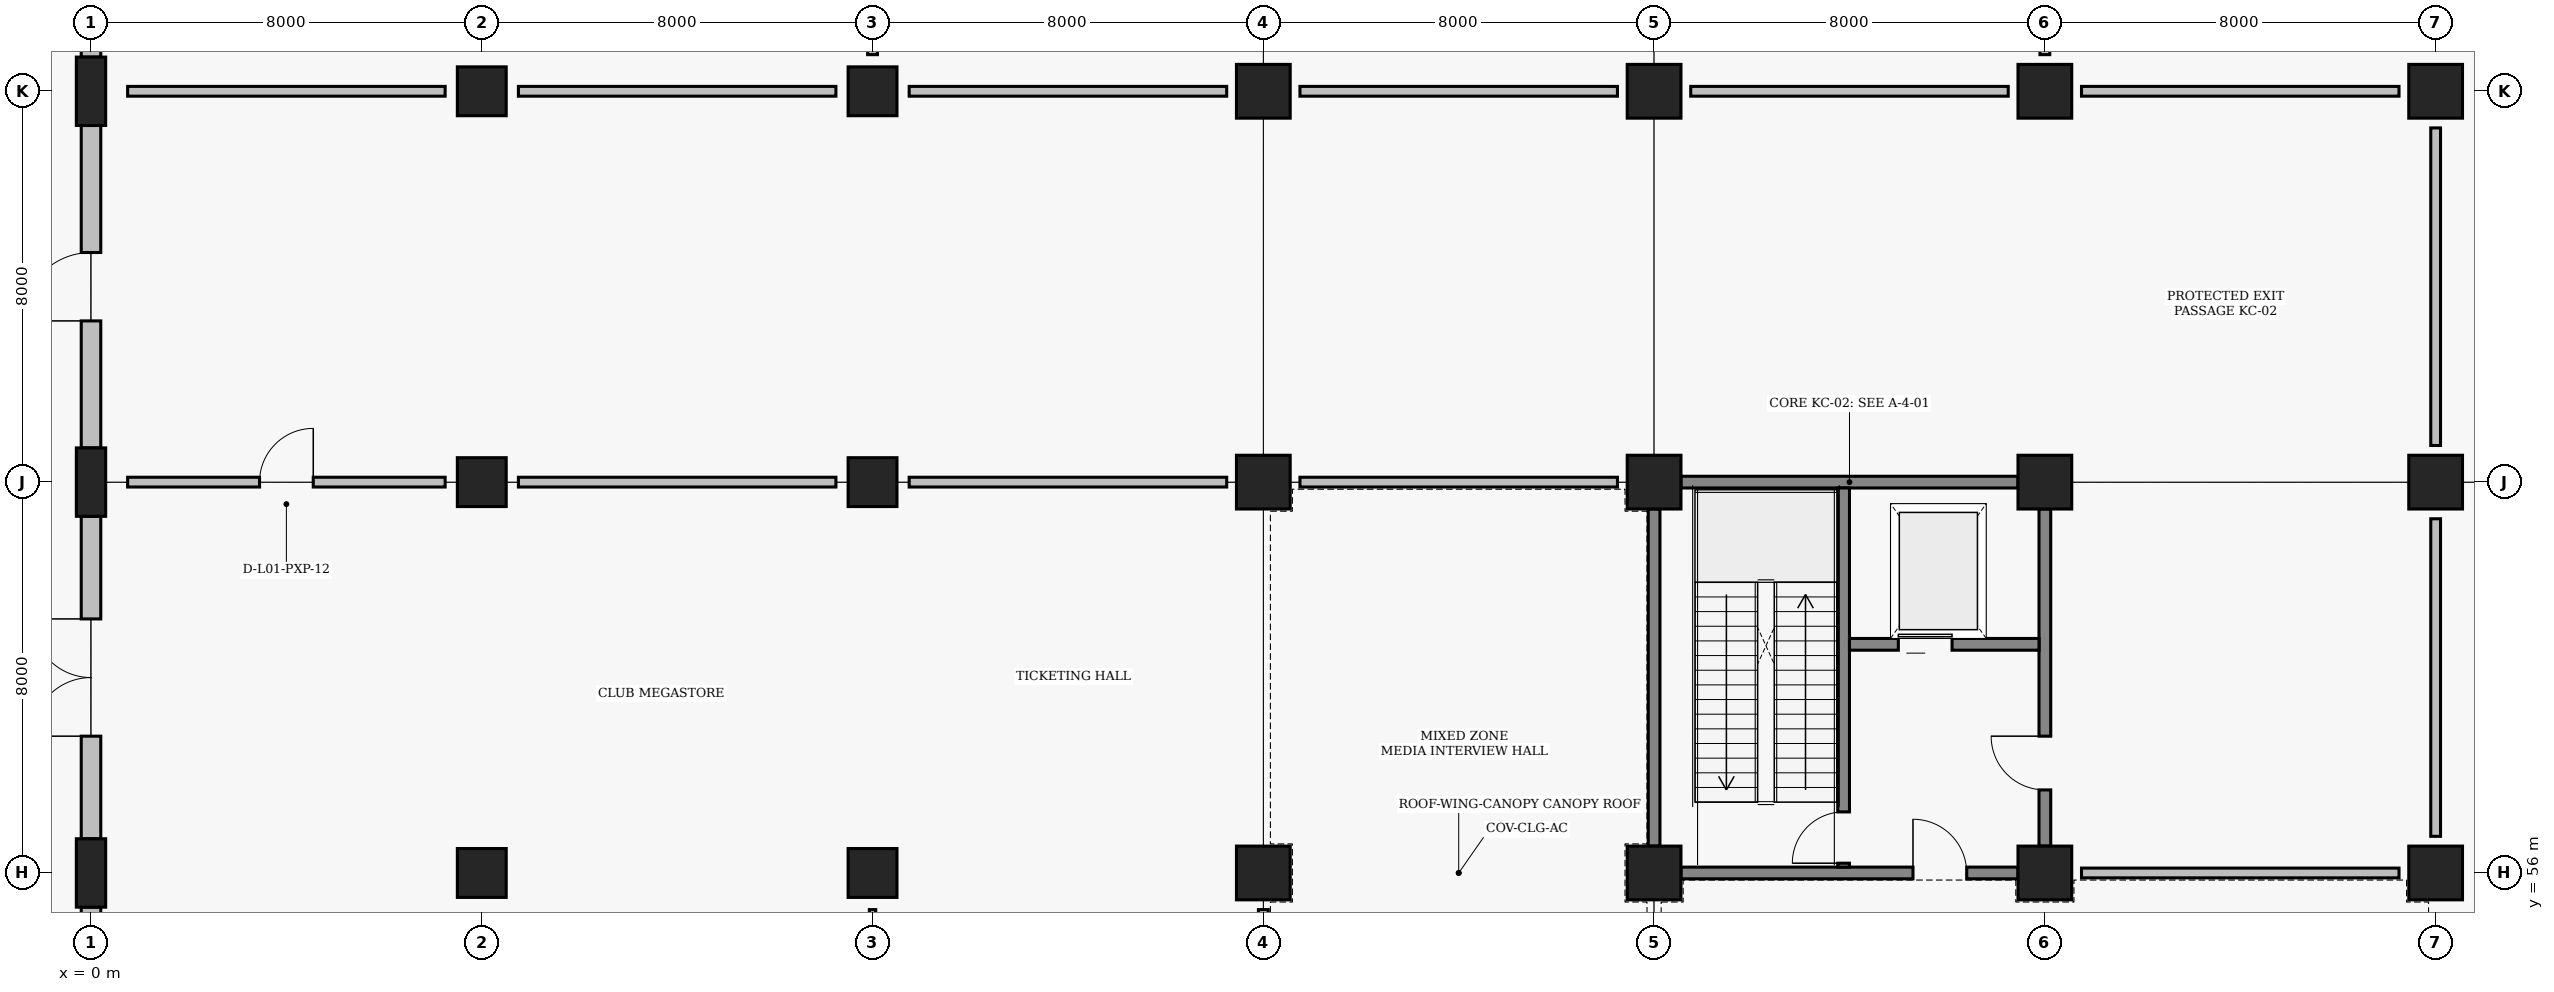
"""IFC4 building model, lengths in metres.
Left out: names, types, materials, properties, quantities, classifications, styles, units other than length and angle.
Written with IfcOpenShell. Run it as: python <this file> out.ifc"""

import sys

from ifc_helpers import new_model, si_unit, direction, frame, frame_2d, origin, origin_2d, place, context, subcontext, project, spatial, rectangle, circle, extrude, element, fill, save


model = new_model("IFC4")
c1 = context("Model", 3, precision=1e-05, world=origin(), true_north=direction((0.0, 1.0)))
c2 = subcontext(c1, "Body", "Model", "MODEL_VIEW")
j1 = project(units=[si_unit("LENGTHUNIT", "METRE"), si_unit("PLANEANGLEUNIT", "RADIAN")], contexts=[c1])
p1 = place(None, origin())
s1 = spatial("IfcSite", under=j1, at=p1, CompositionType="ELEMENT")
p2 = place(p1, origin())
s2 = spatial("IfcBuilding", under=s1, at=p2, CompositionType="ELEMENT")
p3 = place(p2, origin())
s3 = spatial("IfcBuildingStorey", under=s2, at=p3, CompositionType="ELEMENT", Elevation=0.0)
for number, where, z_axis, x_axis in (
    (1, (0.0, 56.0, 0.0), (0.0, 0.0, 1.0), (1.0, 0.0, 0.0)),
    (2, (0.0, 64.0, 0.0), (0.0, 0.0, 1.0), (1.0, 0.0, 0.0)),
    (3, (0.0, 72.0, 0.0), (0.0, 0.0, 1.0), (1.0, 0.0, 0.0)),
):
    element("IfcColumn", number, at=place(p3, frame(where, z_axis=z_axis, x_axis=x_axis)), inside=s3, PredefinedType="PILASTER", context=c2, shape_type="SweptSolid", body=[
        extrude(rectangle(XDim=0.6, YDim=1.4, at=origin_2d()), origin(), (0.0, 0.0, 1.0), 4.8),
    ])
for number, where, z_axis, x_axis in (
    (4, (8.0, 56.0, 0.0), (0.0, 0.0, 1.0), (1.0, 0.0, 0.0)),
    (5, (8.0, 64.0, 0.0), (0.0, 0.0, 1.0), (1.0, 0.0, 0.0)),
    (6, (8.0, 72.0, 0.0), (0.0, 0.0, 1.0), (1.0, 0.0, 0.0)),
    (7, (16.0, 56.0, 0.0), (0.0, 0.0, 1.0), (1.0, 0.0, 0.0)),
    (8, (16.0, 64.0, 0.0), (0.0, 0.0, 1.0), (1.0, 0.0, 0.0)),
    (9, (16.0, 72.0, 0.0), (0.0, 0.0, 1.0), (1.0, 0.0, 0.0)),
):
    element("IfcColumn", number, at=place(p3, frame(where, z_axis=z_axis, x_axis=x_axis)), inside=s3, PredefinedType="COLUMN", context=c2, shape_type="SweptSolid", body=[
        extrude(circle(Radius=0.5, at=origin_2d()), origin(), (0.0, 0.0, 1.0), 4.8),
    ])
for number, where, z_axis, x_axis in (
    (10, (24.0, 56.0, 0.0), (0.0, 0.0, 1.0), (1.0, 0.0, 0.0)),
    (11, (24.0, 64.0, 0.0), (0.0, 0.0, 1.0), (1.0, 0.0, 0.0)),
    (12, (24.0, 72.0, 0.0), (0.0, 0.0, 1.0), (1.0, 0.0, 0.0)),
    (13, (32.0, 56.0, 0.0), (0.0, 0.0, 1.0), (1.0, 0.0, 0.0)),
    (14, (32.0, 64.0, 0.0), (0.0, 0.0, 1.0), (1.0, 0.0, 0.0)),
    (15, (32.0, 72.0, 0.0), (0.0, 0.0, 1.0), (1.0, 0.0, 0.0)),
    (16, (40.0, 56.0, 0.0), (0.0, 0.0, 1.0), (1.0, 0.0, 0.0)),
    (17, (40.0, 64.0, 0.0), (0.0, 0.0, 1.0), (1.0, 0.0, 0.0)),
    (18, (40.0, 72.0, 0.0), (0.0, 0.0, 1.0), (1.0, 0.0, 0.0)),
    (19, (48.0, 56.0, 0.0), (0.0, 0.0, 1.0), (1.0, 0.0, 0.0)),
    (20, (48.0, 64.0, 0.0), (0.0, 0.0, 1.0), (1.0, 0.0, 0.0)),
    (21, (48.0, 72.0, 0.0), (0.0, 0.0, 1.0), (1.0, 0.0, 0.0)),
):
    element("IfcColumn", number, at=place(p3, frame(where, z_axis=z_axis, x_axis=x_axis)), inside=s3, PredefinedType="COLUMN", context=c2, shape_type="SweptSolid", body=[
        extrude(rectangle(XDim=1.1, YDim=1.1, at=origin_2d()), origin(), (0.0, 0.0, 1.0), 4.8),
    ])
p4 = place(p3, frame((0.0, 48.7, 0.0), z_axis=(0.0, 0.0, 1.0), x_axis=(0.0, 1.0, 0.0)))
e22 = element("IfcWall", 22, at=p4, inside=s3, PredefinedType="SOLIDWALL", context=c2, shape_type="SweptSolid", body=[
    extrude(rectangle(XDim=6.6, YDim=0.4, at=frame_2d((3.3, 0.0))), origin(), (0.0, 0.0, 1.0), 3.91),
])
p5 = place(p4, frame((1.6, 0.0, 0.0)))
e23 = element("IfcOpeningElement", 23, at=p5, cuts=e22, PredefinedType="OPENING", context=c2, shape_type="SweptSolid", body=[
    extrude(rectangle(XDim=3.4, YDim=2.75, at=frame_2d((1.7, 1.375))), frame((0.0, 0.21, 0.0), z_axis=(0.0, -1.0, 0.0), x_axis=(1.0, 0.0, 0.0)), (0.0, 0.0, 1.0), 0.42),
])
p6 = place(p3, frame((0.0, 56.7, 0.0), z_axis=(0.0, 0.0, 1.0), x_axis=(0.0, 1.0, 0.0)))
e24 = element("IfcWall", 24, at=p6, inside=s3, PredefinedType="SOLIDWALL", context=c2, shape_type="SweptSolid", body=[
    extrude(rectangle(XDim=6.6, YDim=0.4, at=frame_2d((3.3, 0.0))), origin(), (0.0, 0.0, 1.0), 3.91),
])
p7 = place(p6, frame((2.1, 0.0, 0.0)))
e25 = element("IfcOpeningElement", 25, at=p7, cuts=e24, PredefinedType="OPENING", context=c2, shape_type="SweptSolid", body=[
    extrude(rectangle(XDim=2.4, YDim=2.4, at=frame_2d((1.2, 1.2))), frame((0.0, 0.21, 0.0), z_axis=(0.0, -1.0, 0.0), x_axis=(1.0, 0.0, 0.0)), (0.0, 0.0, 1.0), 0.42),
])
p8 = place(p3, frame((0.0, 64.7, 0.0), z_axis=(0.0, 0.0, 1.0), x_axis=(0.0, 1.0, 0.0)))
e26 = element("IfcWall", 26, at=p8, inside=s3, PredefinedType="SOLIDWALL", context=c2, shape_type="SweptSolid", body=[
    extrude(rectangle(XDim=6.6, YDim=0.4, at=frame_2d((3.3, 0.0))), origin(), (0.0, 0.0, 1.0), 3.91),
])
p9 = place(p8, frame((2.6, 0.0, 0.0)))
e27 = element("IfcOpeningElement", 27, at=p9, cuts=e26, PredefinedType="OPENING", context=c2, shape_type="SweptSolid", body=[
    extrude(rectangle(XDim=1.4, YDim=2.2, at=frame_2d((0.7, 1.1))), frame((0.0, 0.21, 0.0), z_axis=(0.0, -1.0, 0.0), x_axis=(1.0, 0.0, 0.0)), (0.0, 0.0, 1.0), 0.42),
])
p10 = place(p3, frame((0.0, 72.7, 0.0), z_axis=(0.0, 0.0, 1.0), x_axis=(0.0, 1.0, 0.0)))
e28 = element("IfcWall", 28, at=p10, inside=s3, PredefinedType="SOLIDWALL", context=c2, shape_type="SweptSolid", body=[
    extrude(rectangle(XDim=6.6, YDim=0.4, at=frame_2d((3.3, 0.0))), origin(), (0.0, 0.0, 1.0), 3.66),
])
p11 = place(p10, frame((2.6, 0.0, 0.0)))
e29 = element("IfcOpeningElement", 29, at=p11, cuts=e28, PredefinedType="OPENING", context=c2, shape_type="SweptSolid", body=[
    extrude(rectangle(XDim=1.4, YDim=2.2, at=frame_2d((0.7, 1.1))), frame((0.0, 0.21, 0.0), z_axis=(0.0, -1.0, 0.0), x_axis=(1.0, 0.0, 0.0)), (0.0, 0.0, 1.0), 0.42),
])
p12 = place(p3, frame((32.55, 56.0, 0.0), z_axis=(0.0, 0.0, 1.0), x_axis=(1.0, 0.0, 0.0)))
e30 = element("IfcWall", 30, at=p12, inside=s3, PredefinedType="SHEAR", context=c2, shape_type="SweptSolid", body=[
    extrude(rectangle(XDim=6.9, YDim=0.24, at=frame_2d((3.45, 0.0))), origin(), (0.0, 0.0, 1.0), 3.62),
])
p13 = place(p12, frame((4.75, 0.0, 0.0)))
e31 = element("IfcOpeningElement", 31, at=p13, cuts=e30, PredefinedType="OPENING", context=c2, shape_type="SweptSolid", body=[
    extrude(rectangle(XDim=1.1, YDim=2.2, at=frame_2d((0.55, 1.1))), frame((0.0, 0.13, 0.0), z_axis=(0.0, -1.0, 0.0), x_axis=(1.0, 0.0, 0.0)), (0.0, 0.0, 1.0), 0.26),
])
p14 = place(p3, frame((32.55, 64.0, 0.0), z_axis=(0.0, 0.0, 1.0), x_axis=(1.0, 0.0, 0.0)))
e32 = element("IfcWall", 32, at=p14, inside=s3, PredefinedType="SHEAR", context=c2, shape_type="SweptSolid", body=[
    extrude(rectangle(XDim=6.9, YDim=0.24, at=frame_2d((3.45, 0.0))), origin(), (0.0, 0.0, 1.0), 3.77),
])
p15 = place(p3, frame((32.0, 56.55, 0.0), z_axis=(0.0, 0.0, 1.0), x_axis=(0.0, 1.0, 0.0)))
e33 = element("IfcWall", 33, at=p15, inside=s3, PredefinedType="SHEAR", context=c2, shape_type="SweptSolid", body=[
    extrude(rectangle(XDim=6.9, YDim=0.24, at=frame_2d((3.45, 0.0))), origin(), (0.0, 0.0, 1.0), 3.62),
])
p16 = place(p3, frame((40.0, 56.55, 0.0), z_axis=(0.0, 0.0, 1.0), x_axis=(0.0, 1.0, 0.0)))
e34 = element("IfcWall", 34, at=p16, inside=s3, PredefinedType="SHEAR", context=c2, shape_type="SweptSolid", body=[
    extrude(rectangle(XDim=6.9, YDim=0.24, at=frame_2d((3.45, 0.0))), origin(), (0.0, 0.0, 1.0), 3.77),
])
p17 = place(p16, frame((1.15, 0.0, 0.0)))
e35 = element("IfcOpeningElement", 35, at=p17, cuts=e34, PredefinedType="OPENING", context=c2, shape_type="SweptSolid", body=[
    extrude(rectangle(XDim=1.1, YDim=2.2, at=frame_2d((0.55, 1.1))), frame((0.0, 0.13, 0.0), z_axis=(0.0, -1.0, 0.0), x_axis=(1.0, 0.0, 0.0)), (0.0, 0.0, 1.0), 0.26),
])
p18 = place(p3, frame((35.88, 56.12, 0.0), z_axis=(0.0, 0.0, 1.0), x_axis=(0.0, 1.0, 0.0)))
e36 = element("IfcWall", 36, at=p18, inside=s3, PredefinedType="SHEAR", context=c2, shape_type="SweptSolid", body=[
    extrude(rectangle(XDim=7.76, YDim=0.24, at=frame_2d((3.88, 0.0))), origin(), (0.0, 0.0, 1.0), 3.97),
])
p19 = place(p18, frame((0.08, 0.0, 0.0)))
e37 = element("IfcOpeningElement", 37, at=p19, cuts=e36, PredefinedType="OPENING", context=c2, shape_type="SweptSolid", body=[
    extrude(rectangle(XDim=1.05, YDim=2.15, at=frame_2d((0.525, 1.075))), frame((0.0, 0.13, 0.0), z_axis=(0.0, -1.0, 0.0), x_axis=(1.0, 0.0, 0.0)), (0.0, 0.0, 1.0), 0.26),
])
p20 = place(p3, frame((36.0, 60.68, 0.0), z_axis=(0.0, 0.0, 1.0), x_axis=(1.0, 0.0, 0.0)))
e38 = element("IfcWall", 38, at=p20, inside=s3, PredefinedType="SHEAR", context=c2, shape_type="SweptSolid", body=[
    extrude(rectangle(XDim=3.88, YDim=0.24, at=frame_2d((1.94, 0.0))), origin(), (0.0, 0.0, 1.0), 3.77),
])
p21 = place(p20, frame((1.0, 0.0, 0.0)))
e39 = element("IfcOpeningElement", 39, at=p21, cuts=e38, PredefinedType="OPENING", context=c2, shape_type="SweptSolid", body=[
    extrude(rectangle(XDim=1.1, YDim=2.15, at=frame_2d((0.55, 1.075))), frame((0.0, 0.13, 0.0), z_axis=(0.0, -1.0, 0.0), x_axis=(1.0, 0.0, 0.0)), (0.0, 0.0, 1.0), 0.26),
])
p22 = place(p3, frame((24.0, 48.75, 0.0), z_axis=(0.0, 0.0, 1.0), x_axis=(0.0, 1.0, 0.0)))
e40 = element("IfcWall", 40, at=p22, inside=s3, PredefinedType="PARTITIONING", context=c2, shape_type="SweptSolid", body=[
    extrude(rectangle(XDim=6.5, YDim=0.2, at=frame_2d((3.25, 0.0))), origin(), (0.0, 0.0, 1.0), 3.77),
])
p23 = place(p3, frame((0.75, 72.0, 0.0), z_axis=(0.0, 0.0, 1.0), x_axis=(1.0, 0.0, 0.0)))
e41 = element("IfcWall", 41, at=p23, inside=s3, PredefinedType="PARTITIONING", context=c2, shape_type="SweptSolid", body=[
    extrude(rectangle(XDim=6.5, YDim=0.2, at=frame_2d((3.25, 0.0))), origin(), (0.0, 0.0, 1.0), 3.91),
])
p24 = place(p3, frame((16.0, 72.75, 0.0), z_axis=(0.0, 0.0, 1.0), x_axis=(0.0, 1.0, 0.0)))
e42 = element("IfcWall", 42, at=p24, inside=s3, PredefinedType="PARTITIONING", context=c2, shape_type="SweptSolid", body=[
    extrude(rectangle(XDim=6.5, YDim=0.2, at=frame_2d((3.25, 0.0))), origin(), (0.0, 0.0, 1.0), 3.81),
])
p25 = place(p3, frame((8.75, 72.0, 0.0), z_axis=(0.0, 0.0, 1.0), x_axis=(1.0, 0.0, 0.0)))
e43 = element("IfcWall", 43, at=p25, inside=s3, PredefinedType="PARTITIONING", context=c2, shape_type="SweptSolid", body=[
    extrude(rectangle(XDim=6.5, YDim=0.2, at=frame_2d((3.25, 0.0))), origin(), (0.0, 0.0, 1.0), 3.66),
])
p26 = place(p3, frame((0.75, 64.0, 0.0), z_axis=(0.0, 0.0, 1.0), x_axis=(1.0, 0.0, 0.0)))
e44 = element("IfcWall", 44, at=p26, inside=s3, PredefinedType="PARTITIONING", context=c2, shape_type="SweptSolid", body=[
    extrude(rectangle(XDim=6.5, YDim=0.2, at=frame_2d((3.25, 0.0))), origin(), (0.0, 0.0, 1.0), 3.91),
])
p27 = place(p26, frame((2.7, 0.0, 0.0)))
e45 = element("IfcOpeningElement", 45, at=p27, cuts=e44, PredefinedType="OPENING", context=c2, shape_type="SweptSolid", body=[
    extrude(rectangle(XDim=1.1, YDim=2.2, at=frame_2d((0.55, 1.1))), frame((0.0, 0.11, 0.0), z_axis=(0.0, -1.0, 0.0), x_axis=(1.0, 0.0, 0.0)), (0.0, 0.0, 1.0), 0.22),
])
p28 = place(p3, frame((8.75, 64.0, 0.0), z_axis=(0.0, 0.0, 1.0), x_axis=(1.0, 0.0, 0.0)))
e46 = element("IfcWall", 46, at=p28, inside=s3, PredefinedType="PARTITIONING", context=c2, shape_type="SweptSolid", body=[
    extrude(rectangle(XDim=6.5, YDim=0.2, at=frame_2d((3.25, 0.0))), origin(), (0.0, 0.0, 1.0), 3.91),
])
p29 = place(p3, frame((16.75, 64.0, 0.0), z_axis=(0.0, 0.0, 1.0), x_axis=(1.0, 0.0, 0.0)))
e47 = element("IfcWall", 47, at=p29, inside=s3, PredefinedType="PARTITIONING", context=c2, shape_type="SweptSolid", body=[
    extrude(rectangle(XDim=6.5, YDim=0.2, at=frame_2d((3.25, 0.0))), origin(), (0.0, 0.0, 1.0), 3.66),
])
p30 = place(p3, frame((16.75, 72.0, 0.0), z_axis=(0.0, 0.0, 1.0), x_axis=(1.0, 0.0, 0.0)))
e48 = element("IfcWall", 48, at=p30, inside=s3, PredefinedType="PARTITIONING", context=c2, shape_type="SweptSolid", body=[
    extrude(rectangle(XDim=6.5, YDim=0.2, at=frame_2d((3.25, 0.0))), origin(), (0.0, 0.0, 1.0), 3.91),
])
for number, where, z_axis, x_axis in (
    (49, (24.75, 64.0, 0.0), (0.0, 0.0, 1.0), (1.0, 0.0, 0.0)),
    (50, (24.75, 72.0, 0.0), (0.0, 0.0, 1.0), (1.0, 0.0, 0.0)),
    (51, (32.75, 72.0, 0.0), (0.0, 0.0, 1.0), (1.0, 0.0, 0.0)),
):
    element("IfcWall", number, at=place(p3, frame(where, z_axis=z_axis, x_axis=x_axis)), inside=s3, PredefinedType="PARTITIONING", context=c2, shape_type="SweptSolid", body=[
        extrude(rectangle(XDim=6.5, YDim=0.2, at=frame_2d((3.25, 0.0))), origin(), (0.0, 0.0, 1.0), 3.87),
    ])
p31 = place(p3, frame((48.0, 56.75, 0.0), z_axis=(0.0, 0.0, 1.0), x_axis=(0.0, 1.0, 0.0)))
e52 = element("IfcWall", 52, at=p31, inside=s3, PredefinedType="PARTITIONING", context=c2, shape_type="SweptSolid", body=[
    extrude(rectangle(XDim=6.5, YDim=0.2, at=frame_2d((3.25, 0.0))), origin(), (0.0, 0.0, 1.0), 3.77),
])
p32 = place(p3, frame((40.75, 56.0, 0.0), z_axis=(0.0, 0.0, 1.0), x_axis=(1.0, 0.0, 0.0)))
e53 = element("IfcWall", 53, at=p32, inside=s3, PredefinedType="PARTITIONING", context=c2, shape_type="SweptSolid", body=[
    extrude(rectangle(XDim=6.5, YDim=0.2, at=frame_2d((3.25, 0.0))), origin(), (0.0, 0.0, 1.0), 3.87),
])
p33 = place(p3, frame((48.0, 64.75, 0.0), z_axis=(0.0, 0.0, 1.0), x_axis=(0.0, 1.0, 0.0)))
e54 = element("IfcWall", 54, at=p33, inside=s3, PredefinedType="PARTITIONING", context=c2, shape_type="SweptSolid", body=[
    extrude(rectangle(XDim=6.5, YDim=0.2, at=frame_2d((3.25, 0.0))), origin(), (0.0, 0.0, 1.0), 3.77),
])
p34 = place(p3, frame((40.75, 72.0, 0.0), z_axis=(0.0, 0.0, 1.0), x_axis=(1.0, 0.0, 0.0)))
e55 = element("IfcWall", 55, at=p34, inside=s3, PredefinedType="PARTITIONING", context=c2, shape_type="SweptSolid", body=[
    extrude(rectangle(XDim=6.5, YDim=0.2, at=frame_2d((3.25, 0.0))), origin(), (0.0, 0.0, 1.0), 3.87),
])
p35 = place(p3, frame((40.0, 72.75, 0.0), z_axis=(0.0, 0.0, 1.0), x_axis=(0.0, 1.0, 0.0)))
e56 = element("IfcWall", 56, at=p35, inside=s3, PredefinedType="PARTITIONING", context=c2, shape_type="SweptSolid", body=[
    extrude(rectangle(XDim=6.5, YDim=0.2, at=frame_2d((3.25, 0.0))), origin(), (0.0, 0.0, 1.0), 3.77),
])
p36 = place(p3, frame((16.0, 48.75, 0.0), z_axis=(0.0, 0.0, 1.0), x_axis=(0.0, 1.0, 0.0)))
e57 = element("IfcWall", 57, at=p36, inside=s3, PredefinedType="PARTITIONING", context=c2, shape_type="SweptSolid", body=[
    extrude(rectangle(XDim=6.5, YDim=0.13, at=frame_2d((3.25, 0.0))), origin(), (0.0, 0.0, 1.0), 3.81),
])
p37 = place(p36, frame((2.75, 0.0, 0.0)))
e58 = element("IfcOpeningElement", 58, at=p37, cuts=e57, PredefinedType="OPENING", context=c2, shape_type="SweptSolid", body=[
    extrude(rectangle(XDim=1.0, YDim=2.1, at=frame_2d((0.5, 1.05))), frame((0.0, 0.075, 0.0), z_axis=(0.0, -1.0, 0.0), x_axis=(1.0, 0.0, 0.0)), (0.0, 0.0, 1.0), 0.15),
])
p38 = place(p7, origin())
e59 = element("IfcDoor", 59, at=p38, inside=s3, OperationType="DOUBLE_SWING_LEFT", PredefinedType="DOOR", context=c2, shape_type="SweptSolid", body=[
    extrude(rectangle(XDim=2.4, YDim=2.4, at=frame_2d((1.2, 1.2))), frame((0.0, 0.025, 0.0), z_axis=(0.0, -1.0, 0.0), x_axis=(1.0, 0.0, 0.0)), (0.0, 0.0, 1.0), 0.05),
])
fill(e25, e59)
p39 = place(p9, origin())
e60 = element("IfcDoor", 60, at=p39, inside=s3, OperationType="SINGLE_SWING_LEFT", PredefinedType="DOOR", context=c2, shape_type="SweptSolid", body=[
    extrude(rectangle(XDim=1.4, YDim=2.2, at=frame_2d((0.7, 1.1))), frame((0.0, 0.025, 0.0), z_axis=(0.0, -1.0, 0.0), x_axis=(1.0, 0.0, 0.0)), (0.0, 0.0, 1.0), 0.05),
])
fill(e27, e60)
p40 = place(p13, origin())
e61 = element("IfcDoor", 61, at=p40, inside=s3, OperationType="SINGLE_SWING_LEFT", PredefinedType="DOOR", context=c2, shape_type="SweptSolid", body=[
    extrude(rectangle(XDim=1.1, YDim=2.2, at=frame_2d((0.55, 1.1))), frame((0.0, 0.025, 0.0), z_axis=(0.0, -1.0, 0.0), x_axis=(1.0, 0.0, 0.0)), (0.0, 0.0, 1.0), 0.05),
])
fill(e31, e61)
p41 = place(p17, origin())
e62 = element("IfcDoor", 62, at=p41, inside=s3, OperationType="SINGLE_SWING_RIGHT", PredefinedType="DOOR", context=c2, shape_type="SweptSolid", body=[
    extrude(rectangle(XDim=1.1, YDim=2.2, at=frame_2d((0.55, 1.1))), frame((0.0, 0.025, 0.0), z_axis=(0.0, -1.0, 0.0), x_axis=(1.0, 0.0, 0.0)), (0.0, 0.0, 1.0), 0.05),
])
fill(e35, e62)
p42 = place(p19, origin())
e63 = element("IfcDoor", 63, at=p42, inside=s3, OperationType="SINGLE_SWING_LEFT", PredefinedType="DOOR", context=c2, shape_type="SweptSolid", body=[
    extrude(rectangle(XDim=1.05, YDim=2.15, at=frame_2d((0.525, 1.075))), frame((0.0, 0.025, 0.0), z_axis=(0.0, -1.0, 0.0), x_axis=(1.0, 0.0, 0.0)), (0.0, 0.0, 1.0), 0.05),
])
fill(e37, e63)
p43 = place(p21, origin())
e64 = element("IfcDoor", 64, at=p43, inside=s3, OperationType="SLIDING_TO_LEFT", PredefinedType="DOOR", context=c2, shape_type="SweptSolid", body=[
    extrude(rectangle(XDim=1.1, YDim=2.15, at=frame_2d((0.55, 1.075))), frame((0.0, 0.025, 0.0), z_axis=(0.0, -1.0, 0.0), x_axis=(1.0, 0.0, 0.0)), (0.0, 0.0, 1.0), 0.05),
])
fill(e39, e64)
p44 = place(p27, origin())
e65 = element("IfcDoor", 65, at=p44, inside=s3, OperationType="SINGLE_SWING_RIGHT", PredefinedType="DOOR", context=c2, shape_type="SweptSolid", body=[
    extrude(rectangle(XDim=1.1, YDim=2.2, at=frame_2d((0.55, 1.1))), frame((0.0, 0.025, 0.0), z_axis=(0.0, -1.0, 0.0), x_axis=(1.0, 0.0, 0.0)), (0.0, 0.0, 1.0), 0.05),
])
fill(e45, e65)
save(model, sys.argv[1])
